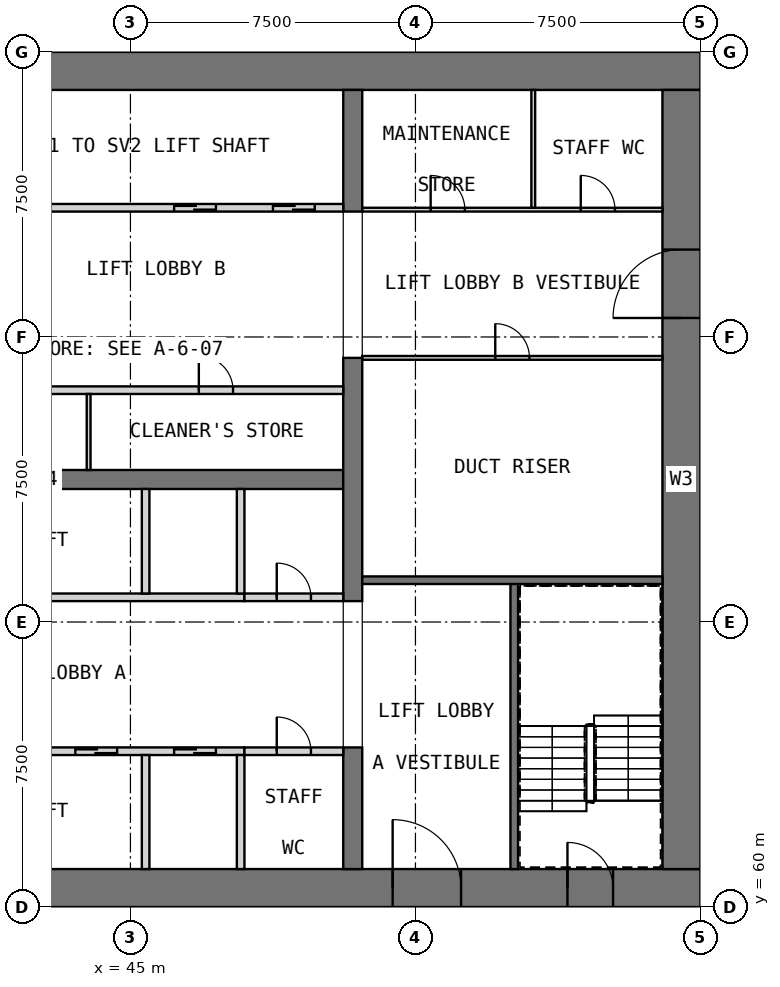
"""IFC4 building model, lengths in metres.
Left out: names, types, materials, properties, quantities, classifications, styles, units other than length and angle.
Written with IfcOpenShell. Run it as: python <this file> out.ifc"""

import sys

from ifc_helpers import new_model, si_unit, direction, frame, frame_2d, origin, place, context, subcontext, project, spatial, rectangle, extrude, element, fill, save


model = new_model("IFC4")
c1 = context("Model", 3, precision=1e-05, world=origin(), true_north=direction((0.0, 1.0)))
c2 = subcontext(c1, "Body", "Model", "MODEL_VIEW")
j1 = project(units=[si_unit("LENGTHUNIT", "METRE"), si_unit("PLANEANGLEUNIT", "RADIAN")], contexts=[c1])
p1 = place(None, origin())
s1 = spatial("IfcSite", under=j1, at=p1, CompositionType="ELEMENT")
p2 = place(p1, origin())
s2 = spatial("IfcBuilding", under=s1, at=p2, CompositionType="ELEMENT")
p3 = place(p2, frame((0.0, 0.0, 23.5)))
s3 = spatial("IfcBuildingStorey", under=s2, at=p3, CompositionType="ELEMENT", Elevation=23.5)
p4 = place(p3, frame((30.0, 60.5, 0.0), z_axis=(0.0, 0.0, 1.0), x_axis=(1.0, 0.0, 0.0)))
e1 = element("IfcWall", 1, at=p4, inside=s3, PredefinedType="SHEAR", context=c2, shape_type="SweptSolid", body=[
    extrude(rectangle(XDim=30.0, YDim=1.0, at=frame_2d((15.0, 0.0))), origin(), (0.0, 0.0, 1.0), 5.5),
])
p5 = place(p4, frame((21.9, 0.0, 0.0)))
e2 = element("IfcOpeningElement", 2, at=p5, cuts=e1, PredefinedType="OPENING", context=c2, shape_type="SweptSolid", body=[
    extrude(rectangle(XDim=1.8, YDim=2.1, at=frame_2d((0.9, 1.05))), frame((0.0, 0.51, 0.0), z_axis=(0.0, -1.0, 0.0), x_axis=(1.0, 0.0, 0.0)), (0.0, 0.0, 1.0), 1.02),
])
p6 = place(p4, frame((26.5, 0.0, 0.0)))
e3 = element("IfcOpeningElement", 3, at=p6, cuts=e1, PredefinedType="OPENING", context=c2, shape_type="SweptSolid", body=[
    extrude(rectangle(XDim=1.2, YDim=2.1, at=frame_2d((0.6, 1.05))), frame((0.0, 0.51, 0.0), z_axis=(0.0, -1.0, 0.0), x_axis=(1.0, 0.0, 0.0)), (0.0, 0.0, 1.0), 1.02),
])
p7 = place(p3, frame((30.0, 82.0, 0.0), z_axis=(0.0, 0.0, 1.0), x_axis=(1.0, 0.0, 0.0)))
e4 = element("IfcWall", 4, at=p7, inside=s3, PredefinedType="SHEAR", context=c2, shape_type="SweptSolid", body=[
    extrude(rectangle(XDim=30.0, YDim=1.0, at=frame_2d((15.0, 0.0))), origin(), (0.0, 0.0, 1.0), 5.5),
])
p8 = place(p3, frame((59.5, 61.0, 0.0), z_axis=(0.0, 0.0, 1.0), x_axis=(0.0, 1.0, 0.0)))
e5 = element("IfcWall", 5, at=p8, inside=s3, PredefinedType="SHEAR", context=c2, shape_type="SweptSolid", body=[
    extrude(rectangle(XDim=20.5, YDim=1.0, at=frame_2d((10.25, 0.0))), origin(), (0.0, 0.0, 1.0), 5.5),
])
p9 = place(p8, frame((14.5, 0.0, 0.0)))
e6 = element("IfcOpeningElement", 6, at=p9, cuts=e5, PredefinedType="OPENING", context=c2, shape_type="SweptSolid", body=[
    extrude(rectangle(XDim=1.8, YDim=2.1, at=frame_2d((0.9, 1.05))), frame((0.0, 0.51, 0.0), z_axis=(0.0, -1.0, 0.0), x_axis=(1.0, 0.0, 0.0)), (0.0, 0.0, 1.0), 1.02),
])
p10 = place(p3, frame((35.0, 71.25, 0.0), z_axis=(0.0, 0.0, 1.0), x_axis=(1.0, 0.0, 0.0)))
e7 = element("IfcWall", 7, at=p10, inside=s3, PredefinedType="SHEAR", context=c2, shape_type="SweptSolid", body=[
    extrude(rectangle(XDim=15.6, YDim=0.5, at=frame_2d((7.8, 0.0))), origin(), (0.0, 0.0, 1.0), 5.5),
])
p11 = place(p3, frame((50.85, 61.0, 0.0), z_axis=(0.0, 0.0, 1.0), x_axis=(0.0, 1.0, 0.0)))
e8 = element("IfcWall", 8, at=p11, inside=s3, PredefinedType="SHEAR", context=c2, shape_type="SweptSolid", body=[
    extrude(rectangle(XDim=3.2, YDim=0.5, at=frame_2d((1.6, 0.0))), origin(), (0.0, 0.0, 1.0), 5.5),
])
p12 = place(p3, frame((50.85, 68.05, 0.0), z_axis=(0.0, 0.0, 1.0), x_axis=(0.0, 1.0, 0.0)))
e9 = element("IfcWall", 9, at=p12, inside=s3, PredefinedType="SHEAR", context=c2, shape_type="SweptSolid", body=[
    extrude(rectangle(XDim=6.4, YDim=0.5, at=frame_2d((3.2, 0.0))), origin(), (0.0, 0.0, 1.0), 5.5),
])
p13 = place(p3, frame((50.85, 78.3, 0.0), z_axis=(0.0, 0.0, 1.0), x_axis=(0.0, 1.0, 0.0)))
e10 = element("IfcWall", 10, at=p13, inside=s3, PredefinedType="SHEAR", context=c2, shape_type="SweptSolid", body=[
    extrude(rectangle(XDim=3.2, YDim=0.5, at=frame_2d((1.6, 0.0))), origin(), (0.0, 0.0, 1.0), 5.5),
])
p14 = place(p3, frame((35.0, 64.1, 0.0), z_axis=(0.0, 0.0, 1.0), x_axis=(1.0, 0.0, 0.0)))
e11 = element("IfcWall", 11, at=p14, inside=s3, PredefinedType="SOLIDWALL", context=c2, shape_type="SweptSolid", body=[
    extrude(rectangle(XDim=13.0, YDim=0.2, at=frame_2d((6.5, 0.0))), origin(), (0.0, 0.0, 1.0), 5.5),
])
p15 = place(p14, frame((0.75, 0.0, 0.0)))
e12 = element("IfcOpeningElement", 12, at=p15, cuts=e11, PredefinedType="OPENING", context=c2, shape_type="SweptSolid", body=[
    extrude(rectangle(XDim=1.1, YDim=2.1, at=frame_2d((0.55, 1.05))), frame((0.0, 0.11, 0.0), z_axis=(0.0, -1.0, 0.0), x_axis=(1.0, 0.0, 0.0)), (0.0, 0.0, 1.0), 0.22),
])
p16 = place(p14, frame((3.35, 0.0, 0.0)))
e13 = element("IfcOpeningElement", 13, at=p16, cuts=e11, PredefinedType="OPENING", context=c2, shape_type="SweptSolid", body=[
    extrude(rectangle(XDim=1.1, YDim=2.1, at=frame_2d((0.55, 1.05))), frame((0.0, 0.11, 0.0), z_axis=(0.0, -1.0, 0.0), x_axis=(1.0, 0.0, 0.0)), (0.0, 0.0, 1.0), 0.22),
])
p17 = place(p14, frame((5.95, 0.0, 0.0)))
e14 = element("IfcOpeningElement", 14, at=p17, cuts=e11, PredefinedType="OPENING", context=c2, shape_type="SweptSolid", body=[
    extrude(rectangle(XDim=1.1, YDim=2.1, at=frame_2d((0.55, 1.05))), frame((0.0, 0.11, 0.0), z_axis=(0.0, -1.0, 0.0), x_axis=(1.0, 0.0, 0.0)), (0.0, 0.0, 1.0), 0.22),
])
p18 = place(p14, frame((8.55, 0.0, 0.0)))
e15 = element("IfcOpeningElement", 15, at=p18, cuts=e11, PredefinedType="OPENING", context=c2, shape_type="SweptSolid", body=[
    extrude(rectangle(XDim=1.1, YDim=2.1, at=frame_2d((0.55, 1.05))), frame((0.0, 0.11, 0.0), z_axis=(0.0, -1.0, 0.0), x_axis=(1.0, 0.0, 0.0)), (0.0, 0.0, 1.0), 0.22),
])
p19 = place(p14, frame((11.15, 0.0, 0.0)))
e16 = element("IfcOpeningElement", 16, at=p19, cuts=e11, PredefinedType="OPENING", context=c2, shape_type="SweptSolid", body=[
    extrude(rectangle(XDim=1.1, YDim=2.1, at=frame_2d((0.55, 1.05))), frame((0.0, 0.11, 0.0), z_axis=(0.0, -1.0, 0.0), x_axis=(1.0, 0.0, 0.0)), (0.0, 0.0, 1.0), 0.22),
])
for number, where, z_axis, x_axis in (
    (17, (45.4, 61.0, 0.0), (0.0, 0.0, 1.0), (0.0, 1.0, 0.0)),
    (18, (47.9, 61.0, 0.0), (0.0, 0.0, 1.0), (0.0, 1.0, 0.0)),
):
    element("IfcWall", number, at=place(p3, frame(where, z_axis=z_axis, x_axis=x_axis)), inside=s3, PredefinedType="SOLIDWALL", context=c2, shape_type="SweptSolid", body=[
        extrude(rectangle(XDim=3.0, YDim=0.2, at=frame_2d((1.5, 0.0))), origin(), (0.0, 0.0, 1.0), 5.5),
    ])
p20 = place(p3, frame((48.0, 64.1, 0.0), z_axis=(0.0, 0.0, 1.0), x_axis=(1.0, 0.0, 0.0)))
e19 = element("IfcWall", 19, at=p20, inside=s3, PredefinedType="PARTITIONING", context=c2, shape_type="SweptSolid", body=[
    extrude(rectangle(XDim=2.6, YDim=0.2, at=frame_2d((1.3, 0.0))), origin(), (0.0, 0.0, 1.0), 5.2),
])
p21 = place(p20, frame((0.85, 0.0, 0.0)))
e20 = element("IfcOpeningElement", 20, at=p21, cuts=e19, PredefinedType="OPENING", context=c2, shape_type="SweptSolid", body=[
    extrude(rectangle(XDim=0.9, YDim=2.1, at=frame_2d((0.45, 1.05))), frame((0.0, 0.11, 0.0), z_axis=(0.0, -1.0, 0.0), x_axis=(1.0, 0.0, 0.0)), (0.0, 0.0, 1.0), 0.22),
])
p22 = place(p3, frame((35.0, 68.15, 0.0), z_axis=(0.0, 0.0, 1.0), x_axis=(1.0, 0.0, 0.0)))
e21 = element("IfcWall", 21, at=p22, inside=s3, PredefinedType="SOLIDWALL", context=c2, shape_type="SweptSolid", body=[
    extrude(rectangle(XDim=13.0, YDim=0.2, at=frame_2d((6.5, 0.0))), origin(), (0.0, 0.0, 1.0), 5.5),
])
p23 = place(p22, frame((0.75, 0.0, 0.0)))
e22 = element("IfcOpeningElement", 22, at=p23, cuts=e21, PredefinedType="OPENING", context=c2, shape_type="SweptSolid", body=[
    extrude(rectangle(XDim=1.1, YDim=2.1, at=frame_2d((0.55, 1.05))), frame((0.0, 0.11, 0.0), z_axis=(0.0, -1.0, 0.0), x_axis=(1.0, 0.0, 0.0)), (0.0, 0.0, 1.0), 0.22),
])
for number, where, z_axis, x_axis in (
    (23, (45.4, 68.25, 0.0), (0.0, 0.0, 1.0), (0.0, 1.0, 0.0)),
    (24, (47.9, 68.25, 0.0), (0.0, 0.0, 1.0), (0.0, 1.0, 0.0)),
):
    element("IfcWall", number, at=place(p3, frame(where, z_axis=z_axis, x_axis=x_axis)), inside=s3, PredefinedType="SOLIDWALL", context=c2, shape_type="SweptSolid", body=[
        extrude(rectangle(XDim=2.75, YDim=0.2, at=frame_2d((1.375, 0.0))), origin(), (0.0, 0.0, 1.0), 5.5),
    ])
p24 = place(p3, frame((48.0, 68.15, 0.0), z_axis=(0.0, 0.0, 1.0), x_axis=(1.0, 0.0, 0.0)))
e25 = element("IfcWall", 25, at=p24, inside=s3, PredefinedType="PARTITIONING", context=c2, shape_type="SweptSolid", body=[
    extrude(rectangle(XDim=2.6, YDim=0.2, at=frame_2d((1.3, 0.0))), origin(), (0.0, 0.0, 1.0), 5.2),
])
p25 = place(p24, frame((0.85, 0.0, 0.0)))
e26 = element("IfcOpeningElement", 26, at=p25, cuts=e25, PredefinedType="OPENING", context=c2, shape_type="SweptSolid", body=[
    extrude(rectangle(XDim=0.9, YDim=2.1, at=frame_2d((0.45, 1.05))), frame((0.0, 0.11, 0.0), z_axis=(0.0, -1.0, 0.0), x_axis=(1.0, 0.0, 0.0)), (0.0, 0.0, 1.0), 0.22),
])
p26 = place(p3, frame((35.0, 73.6, 0.0), z_axis=(0.0, 0.0, 1.0), x_axis=(1.0, 0.0, 0.0)))
e27 = element("IfcWall", 27, at=p26, inside=s3, PredefinedType="PARTITIONING", context=c2, shape_type="SweptSolid", body=[
    extrude(rectangle(XDim=15.6, YDim=0.2, at=frame_2d((7.8, 0.0))), origin(), (0.0, 0.0, 1.0), 5.2),
])
p27 = place(p26, frame((4.0, 0.0, 0.0)))
e28 = element("IfcOpeningElement", 28, at=p27, cuts=e27, PredefinedType="OPENING", context=c2, shape_type="SweptSolid", body=[
    extrude(rectangle(XDim=0.9, YDim=2.1, at=frame_2d((0.45, 1.05))), frame((0.0, 0.11, 0.0), z_axis=(0.0, -1.0, 0.0), x_axis=(1.0, 0.0, 0.0)), (0.0, 0.0, 1.0), 0.22),
])
p28 = place(p26, frame((11.8, 0.0, 0.0)))
e29 = element("IfcOpeningElement", 29, at=p28, cuts=e27, PredefinedType="OPENING", context=c2, shape_type="SweptSolid", body=[
    extrude(rectangle(XDim=0.9, YDim=2.1, at=frame_2d((0.45, 1.05))), frame((0.0, 0.11, 0.0), z_axis=(0.0, -1.0, 0.0), x_axis=(1.0, 0.0, 0.0)), (0.0, 0.0, 1.0), 0.22),
])
p29 = place(p3, frame((43.9, 71.5, 0.0), z_axis=(0.0, 0.0, 1.0), x_axis=(0.0, 1.0, 0.0)))
e30 = element("IfcWall", 30, at=p29, inside=s3, PredefinedType="PARTITIONING", context=c2, shape_type="SweptSolid", body=[
    extrude(rectangle(XDim=2.0, YDim=0.1, at=frame_2d((1.0, 0.0))), origin(), (0.0, 0.0, 1.0), 5.2),
])
p30 = place(p3, frame((35.0, 78.4, 0.0), z_axis=(0.0, 0.0, 1.0), x_axis=(1.0, 0.0, 0.0)))
e31 = element("IfcWall", 31, at=p30, inside=s3, PredefinedType="SOLIDWALL", context=c2, shape_type="SweptSolid", body=[
    extrude(rectangle(XDim=15.6, YDim=0.2, at=frame_2d((7.8, 0.0))), origin(), (0.0, 0.0, 1.0), 5.5),
])
p31 = place(p30, frame((0.75, 0.0, 0.0)))
e32 = element("IfcOpeningElement", 32, at=p31, cuts=e31, PredefinedType="OPENING", context=c2, shape_type="SweptSolid", body=[
    extrude(rectangle(XDim=1.1, YDim=2.1, at=frame_2d((0.55, 1.05))), frame((0.0, 0.11, 0.0), z_axis=(0.0, -1.0, 0.0), x_axis=(1.0, 0.0, 0.0)), (0.0, 0.0, 1.0), 0.22),
])
p32 = place(p30, frame((3.35, 0.0, 0.0)))
e33 = element("IfcOpeningElement", 33, at=p32, cuts=e31, PredefinedType="OPENING", context=c2, shape_type="SweptSolid", body=[
    extrude(rectangle(XDim=1.1, YDim=2.1, at=frame_2d((0.55, 1.05))), frame((0.0, 0.11, 0.0), z_axis=(0.0, -1.0, 0.0), x_axis=(1.0, 0.0, 0.0)), (0.0, 0.0, 1.0), 0.22),
])
p33 = place(p30, frame((11.15, 0.0, 0.0)))
e34 = element("IfcOpeningElement", 34, at=p33, cuts=e31, PredefinedType="OPENING", context=c2, shape_type="SweptSolid", body=[
    extrude(rectangle(XDim=1.1, YDim=2.1, at=frame_2d((0.55, 1.05))), frame((0.0, 0.11, 0.0), z_axis=(0.0, -1.0, 0.0), x_axis=(1.0, 0.0, 0.0)), (0.0, 0.0, 1.0), 0.22),
])
p34 = place(p30, frame((13.75, 0.0, 0.0)))
e35 = element("IfcOpeningElement", 35, at=p34, cuts=e31, PredefinedType="OPENING", context=c2, shape_type="SweptSolid", body=[
    extrude(rectangle(XDim=1.1, YDim=2.1, at=frame_2d((0.55, 1.05))), frame((0.0, 0.11, 0.0), z_axis=(0.0, -1.0, 0.0), x_axis=(1.0, 0.0, 0.0)), (0.0, 0.0, 1.0), 0.22),
])
p35 = place(p3, frame((55.1, 61.0, 0.0), z_axis=(0.0, 0.0, 1.0), x_axis=(0.0, 1.0, 0.0)))
e36 = element("IfcWall", 36, at=p35, inside=s3, PredefinedType="SOLIDWALL", context=c2, shape_type="SweptSolid", body=[
    extrude(rectangle(XDim=7.6, YDim=0.2, at=frame_2d((3.8, 0.0))), origin(), (0.0, 0.0, 1.0), 5.2),
])
p36 = place(p3, frame((51.1, 68.6, 0.0), z_axis=(0.0, 0.0, 1.0), x_axis=(1.0, 0.0, 0.0)))
e37 = element("IfcWall", 37, at=p36, inside=s3, PredefinedType="SOLIDWALL", context=c2, shape_type="SweptSolid", body=[
    extrude(rectangle(XDim=7.9, YDim=0.2, at=frame_2d((3.95, 0.0))), origin(), (0.0, 0.0, 1.0), 5.2),
])
p37 = place(p3, frame((51.1, 74.45, 0.0), z_axis=(0.0, 0.0, 1.0), x_axis=(1.0, 0.0, 0.0)))
e38 = element("IfcWall", 38, at=p37, inside=s3, PredefinedType="PARTITIONING", context=c2, shape_type="SweptSolid", body=[
    extrude(rectangle(XDim=7.9, YDim=0.1, at=frame_2d((3.95, 0.0))), origin(), (0.0, 0.0, 1.0), 5.2),
])
p38 = place(p37, frame((3.5, 0.0, 0.0)))
e39 = element("IfcOpeningElement", 39, at=p38, cuts=e38, PredefinedType="OPENING", context=c2, shape_type="SweptSolid", body=[
    extrude(rectangle(XDim=0.9, YDim=2.1, at=frame_2d((0.45, 1.05))), frame((0.0, 0.06, 0.0), z_axis=(0.0, -1.0, 0.0), x_axis=(1.0, 0.0, 0.0)), (0.0, 0.0, 1.0), 0.12),
])
p39 = place(p3, frame((51.1, 78.35, 0.0), z_axis=(0.0, 0.0, 1.0), x_axis=(1.0, 0.0, 0.0)))
e40 = element("IfcWall", 40, at=p39, inside=s3, PredefinedType="PARTITIONING", context=c2, shape_type="SweptSolid", body=[
    extrude(rectangle(XDim=7.9, YDim=0.1, at=frame_2d((3.95, 0.0))), origin(), (0.0, 0.0, 1.0), 5.2),
])
p40 = place(p39, frame((1.8, 0.0, 0.0)))
e41 = element("IfcOpeningElement", 41, at=p40, cuts=e40, PredefinedType="OPENING", context=c2, shape_type="SweptSolid", body=[
    extrude(rectangle(XDim=0.9, YDim=2.1, at=frame_2d((0.45, 1.05))), frame((0.0, 0.06, 0.0), z_axis=(0.0, -1.0, 0.0), x_axis=(1.0, 0.0, 0.0)), (0.0, 0.0, 1.0), 0.12),
])
p41 = place(p39, frame((5.75, 0.0, 0.0)))
e42 = element("IfcOpeningElement", 42, at=p41, cuts=e40, PredefinedType="OPENING", context=c2, shape_type="SweptSolid", body=[
    extrude(rectangle(XDim=0.9, YDim=2.1, at=frame_2d((0.45, 1.05))), frame((0.0, 0.06, 0.0), z_axis=(0.0, -1.0, 0.0), x_axis=(1.0, 0.0, 0.0)), (0.0, 0.0, 1.0), 0.12),
])
p42 = place(p3, frame((55.6, 78.4, 0.0), z_axis=(0.0, 0.0, 1.0), x_axis=(0.0, 1.0, 0.0)))
e43 = element("IfcWall", 43, at=p42, inside=s3, PredefinedType="PARTITIONING", context=c2, shape_type="SweptSolid", body=[
    extrude(rectangle(XDim=3.1, YDim=0.1, at=frame_2d((1.55, 0.0))), origin(), (0.0, 0.0, 1.0), 5.2),
])
p43 = place(p18, origin())
e44 = element("IfcDoor", 44, at=p43, inside=s3, OperationType="DOUBLE_DOOR_SLIDING", PredefinedType="DOOR", context=c2, shape_type="SweptSolid", body=[
    extrude(rectangle(XDim=1.1, YDim=2.1, at=frame_2d((0.55, 1.05))), frame((0.0, 0.025, 0.0), z_axis=(0.0, -1.0, 0.0), x_axis=(1.0, 0.0, 0.0)), (0.0, 0.0, 1.0), 0.05),
])
fill(e15, e44)
p44 = place(p19, origin())
e45 = element("IfcDoor", 45, at=p44, inside=s3, OperationType="DOUBLE_DOOR_SLIDING", PredefinedType="DOOR", context=c2, shape_type="SweptSolid", body=[
    extrude(rectangle(XDim=1.1, YDim=2.1, at=frame_2d((0.55, 1.05))), frame((0.0, 0.025, 0.0), z_axis=(0.0, -1.0, 0.0), x_axis=(1.0, 0.0, 0.0)), (0.0, 0.0, 1.0), 0.05),
])
fill(e16, e45)
p45 = place(p21, origin())
e46 = element("IfcDoor", 46, at=p45, inside=s3, OperationType="SINGLE_SWING_RIGHT", PredefinedType="DOOR", context=c2, shape_type="SweptSolid", body=[
    extrude(rectangle(XDim=0.9, YDim=2.1, at=frame_2d((0.45, 1.05))), frame((0.0, 0.025, 0.0), z_axis=(0.0, -1.0, 0.0), x_axis=(1.0, 0.0, 0.0)), (0.0, 0.0, 1.0), 0.05),
])
fill(e20, e46)
p46 = place(p25, origin())
e47 = element("IfcDoor", 47, at=p46, inside=s3, OperationType="SINGLE_SWING_RIGHT", PredefinedType="DOOR", context=c2, shape_type="SweptSolid", body=[
    extrude(rectangle(XDim=0.9, YDim=2.1, at=frame_2d((0.45, 1.05))), frame((0.0, 0.025, 0.0), z_axis=(0.0, -1.0, 0.0), x_axis=(1.0, 0.0, 0.0)), (0.0, 0.0, 1.0), 0.05),
])
fill(e26, e47)
p47 = place(p28, origin())
e48 = element("IfcDoor", 48, at=p47, inside=s3, OperationType="SINGLE_SWING_LEFT", PredefinedType="DOOR", context=c2, shape_type="SweptSolid", body=[
    extrude(rectangle(XDim=0.9, YDim=2.1, at=frame_2d((0.45, 1.05))), frame((0.0, 0.025, 0.0), z_axis=(0.0, -1.0, 0.0), x_axis=(1.0, 0.0, 0.0)), (0.0, 0.0, 1.0), 0.05),
])
fill(e29, e48)
p48 = place(p33, origin())
e49 = element("IfcDoor", 49, at=p48, inside=s3, OperationType="DOUBLE_DOOR_SLIDING", PredefinedType="DOOR", context=c2, shape_type="SweptSolid", body=[
    extrude(rectangle(XDim=1.1, YDim=2.1, at=frame_2d((0.55, 1.05))), frame((0.0, 0.025, 0.0), z_axis=(0.0, -1.0, 0.0), x_axis=(1.0, 0.0, 0.0)), (0.0, 0.0, 1.0), 0.05),
])
fill(e34, e49)
p49 = place(p34, origin())
e50 = element("IfcDoor", 50, at=p49, inside=s3, OperationType="DOUBLE_DOOR_SLIDING", PredefinedType="DOOR", context=c2, shape_type="SweptSolid", body=[
    extrude(rectangle(XDim=1.1, YDim=2.1, at=frame_2d((0.55, 1.05))), frame((0.0, 0.025, 0.0), z_axis=(0.0, -1.0, 0.0), x_axis=(1.0, 0.0, 0.0)), (0.0, 0.0, 1.0), 0.05),
])
fill(e35, e50)
p50 = place(p5, origin())
e51 = element("IfcDoor", 51, at=p50, inside=s3, OperationType="DOUBLE_DOOR_SINGLE_SWING", PredefinedType="DOOR", context=c2, shape_type="SweptSolid", body=[
    extrude(rectangle(XDim=1.8, YDim=2.1, at=frame_2d((0.9, 1.05))), frame((0.0, 0.025, 0.0), z_axis=(0.0, -1.0, 0.0), x_axis=(1.0, 0.0, 0.0)), (0.0, 0.0, 1.0), 0.05),
])
fill(e2, e51)
p51 = place(p9, origin())
e52 = element("IfcDoor", 52, at=p51, inside=s3, OperationType="DOUBLE_DOOR_SINGLE_SWING", PredefinedType="DOOR", context=c2, shape_type="SweptSolid", body=[
    extrude(rectangle(XDim=1.8, YDim=2.1, at=frame_2d((0.9, 1.05))), frame((0.0, 0.025, 0.0), z_axis=(0.0, -1.0, 0.0), x_axis=(1.0, 0.0, 0.0)), (0.0, 0.0, 1.0), 0.05),
])
fill(e6, e52)
p52 = place(p6, origin())
e53 = element("IfcDoor", 53, at=p52, inside=s3, OperationType="SINGLE_SWING_LEFT", PredefinedType="DOOR", context=c2, shape_type="SweptSolid", body=[
    extrude(rectangle(XDim=1.2, YDim=2.1, at=frame_2d((0.6, 1.05))), frame((0.0, 0.025, 0.0), z_axis=(0.0, -1.0, 0.0), x_axis=(1.0, 0.0, 0.0)), (0.0, 0.0, 1.0), 0.05),
])
fill(e3, e53)
p53 = place(p38, origin())
e54 = element("IfcDoor", 54, at=p53, inside=s3, OperationType="SINGLE_SWING_RIGHT", PredefinedType="DOOR", context=c2, shape_type="SweptSolid", body=[
    extrude(rectangle(XDim=0.9, YDim=2.1, at=frame_2d((0.45, 1.05))), frame((0.0, 0.025, 0.0), z_axis=(0.0, -1.0, 0.0), x_axis=(1.0, 0.0, 0.0)), (0.0, 0.0, 1.0), 0.05),
])
fill(e39, e54)
p54 = place(p40, origin())
e55 = element("IfcDoor", 55, at=p54, inside=s3, OperationType="SINGLE_SWING_RIGHT", PredefinedType="DOOR", context=c2, shape_type="SweptSolid", body=[
    extrude(rectangle(XDim=0.9, YDim=2.1, at=frame_2d((0.45, 1.05))), frame((0.0, 0.025, 0.0), z_axis=(0.0, -1.0, 0.0), x_axis=(1.0, 0.0, 0.0)), (0.0, 0.0, 1.0), 0.05),
])
fill(e41, e55)
p55 = place(p41, origin())
e56 = element("IfcDoor", 56, at=p55, inside=s3, OperationType="SINGLE_SWING_LEFT", PredefinedType="DOOR", context=c2, shape_type="SweptSolid", body=[
    extrude(rectangle(XDim=0.9, YDim=2.1, at=frame_2d((0.45, 1.05))), frame((0.0, 0.025, 0.0), z_axis=(0.0, -1.0, 0.0), x_axis=(1.0, 0.0, 0.0)), (0.0, 0.0, 1.0), 0.05),
])
fill(e42, e56)
save(model, sys.argv[1])
